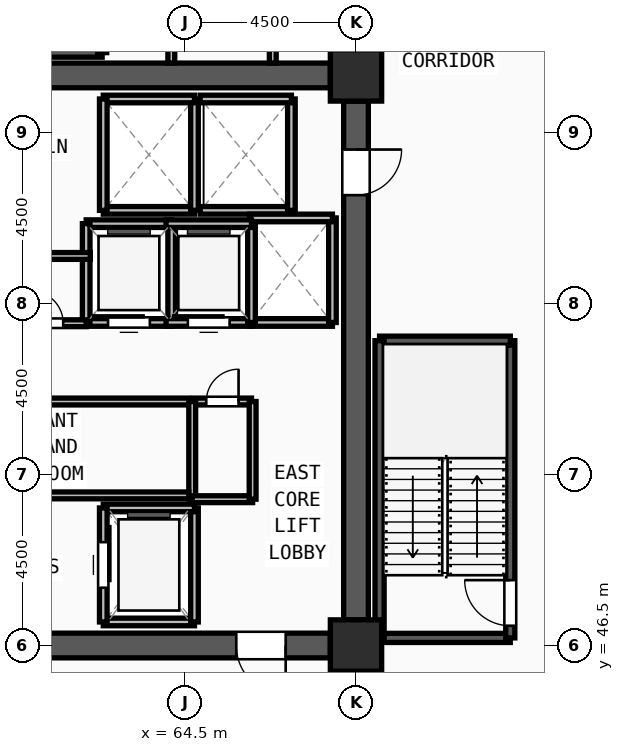
"""IFC4 building model, lengths in metres.
Left out: names, types, materials, properties, quantities, classifications, styles, units other than length and angle.
Written with IfcOpenShell. Run it as: python <this file> out.ifc"""

import sys

from ifc_helpers import new_model, si_unit, direction, frame, frame_2d, origin, origin_2d, place, context, subcontext, project, spatial, rectangle, extrude, source, transform, mapped, element, fill, save


model = new_model("IFC4")
c1 = context("Model", 3, precision=1e-05, world=origin(), true_north=direction((0.0, 1.0)))
c2 = subcontext(c1, "Body", "Model", "MODEL_VIEW")
j1 = project(units=[si_unit("LENGTHUNIT", "METRE"), si_unit("PLANEANGLEUNIT", "RADIAN")], contexts=[c1])
p1 = place(None, origin())
s1 = spatial("IfcSite", under=j1, at=p1, CompositionType="ELEMENT")
p2 = place(p1, origin())
s2 = spatial("IfcBuilding", under=s1, at=p2, CompositionType="ELEMENT")
p3 = place(p2, frame((0.0, 0.0, 270.0)))
s3 = spatial("IfcBuildingStorey", under=s2, at=p3, CompositionType="ELEMENT", Elevation=270.0)
m1 = source(origin(), c2, "Body", "SweptSolid", [
    extrude(rectangle(XDim=1.35, YDim=1.35, at=origin_2d()), origin(), (0.0, 0.0, 1.0), 3.75),
])
for number, where, z_axis, x_axis in (
    (1, (69.0, 46.5, 0.0), (0.0, 0.0, 1.0), (1.0, 0.0, 0.0)),
    (2, (69.0, 61.5, 0.0), (0.0, 0.0, 1.0), (1.0, 0.0, 0.0)),
):
    element("IfcColumn", number, at=place(p3, frame(where, z_axis=z_axis, x_axis=x_axis)), inside=s3, PredefinedType="COLUMN", context=c2, shape_type="MappedRepresentation", body=[
        mapped(m1, transform((0.0, 0.0, 0.0), x_axis=(1.0, 0.0, 0.0), y_axis=(0.0, 1.0, 0.0), z_axis=(0.0, 0.0, 1.0), scale=1.0)),
    ])
p4 = place(p3, frame((60.675, 61.5, 0.0), z_axis=(0.0, 0.0, 1.0), x_axis=(1.0, 0.0, 0.0)))
e3 = element("IfcWall", 3, at=p4, inside=s3, PredefinedType="SHEAR", context=c2, shape_type="SweptSolid", body=[
    extrude(rectangle(XDim=7.65, YDim=0.65, at=frame_2d((3.825, 0.0))), origin(), (0.0, 0.0, 1.0), 3.57),
])
p5 = place(p3, frame((69.0, 60.825, 0.0), z_axis=(0.0, 0.0, 1.0), x_axis=(0.0, -1.0, 0.0)))
e4 = element("IfcWall", 4, at=p5, inside=s3, PredefinedType="SHEAR", context=c2, shape_type="SweptSolid", body=[
    extrude(rectangle(XDim=13.65, YDim=0.65, at=frame_2d((6.825, 0.0))), origin(), (0.0, 0.0, 1.0), 3.57),
])
m2 = source(origin(), c2, "Body", "SweptSolid", [
    extrude(rectangle(XDim=1.2, YDim=2.2, at=frame_2d((0.6, 1.1))), frame((0.0, 0.335, 0.0), z_axis=(0.0, -1.0, 0.0), x_axis=(1.0, 0.0, 0.0)), (0.0, 0.0, 1.0), 0.67),
])
p6 = place(p5, frame((1.275, 0.0, 0.0)))
e5 = element("IfcOpeningElement", 5, at=p6, cuts=e4, PredefinedType="OPENING", context=c2, shape_type="MappedRepresentation", body=[
    mapped(m2, transform((0.0, 0.0, 0.0), x_axis=(1.0, 0.0, 0.0), y_axis=(0.0, 1.0, 0.0), z_axis=(0.0, 0.0, 1.0), scale=1.0)),
])
p7 = place(p3, frame((68.325, 46.5, 0.0), z_axis=(0.0, 0.0, 1.0), x_axis=(-1.0, 0.0, 0.0)))
e6 = element("IfcWall", 6, at=p7, inside=s3, PredefinedType="SHEAR", context=c2, shape_type="SweptSolid", body=[
    extrude(rectangle(XDim=7.65, YDim=0.65, at=frame_2d((3.825, 0.0))), origin(), (0.0, 0.0, 1.0), 3.57),
])
m3 = source(origin(), c2, "Body", "SweptSolid", [
    extrude(rectangle(XDim=1.3, YDim=2.2, at=frame_2d((0.65, 1.1))), frame((0.0, 0.335, 0.0), z_axis=(0.0, -1.0, 0.0), x_axis=(1.0, 0.0, 0.0)), (0.0, 0.0, 1.0), 0.67),
])
p8 = place(p7, frame((1.175, 0.0, 0.0)))
e7 = element("IfcOpeningElement", 7, at=p8, cuts=e6, PredefinedType="OPENING", context=c2, shape_type="MappedRepresentation", body=[
    mapped(m3, transform((0.0, 0.0, 0.0), x_axis=(1.0, 0.0, 0.0), y_axis=(0.0, 1.0, 0.0), z_axis=(0.0, 0.0, 1.0), scale=1.0)),
])
p9 = place(p3, frame((69.62, 46.7, 0.0), z_axis=(0.0, 0.0, 1.0), x_axis=(1.0, 0.0, 0.0)))
e8 = element("IfcWall", 8, at=p9, inside=s3, PredefinedType="SOLIDWALL", context=c2, shape_type="SweptSolid", body=[
    extrude(rectangle(XDim=3.44, YDim=0.24, at=frame_2d((1.72, 0.0))), origin(), (0.0, 0.0, 1.0), 3.57),
])
p10 = place(p3, frame((73.06, 46.7, 0.0), z_axis=(0.0, 0.0, 1.0), x_axis=(0.0, 1.0, 0.0)))
e9 = element("IfcWall", 9, at=p10, inside=s3, PredefinedType="SOLIDWALL", context=c2, shape_type="SweptSolid", body=[
    extrude(rectangle(XDim=7.82, YDim=0.24, at=frame_2d((3.91, 0.0))), origin(), (0.0, 0.0, 1.0), 3.57),
])
m4 = source(origin(), c2, "Body", "SweptSolid", [
    extrude(rectangle(XDim=1.2, YDim=2.2, at=frame_2d((0.6, 1.1))), frame((0.0, 0.13, 0.0), z_axis=(0.0, -1.0, 0.0), x_axis=(1.0, 0.0, 0.0)), (0.0, 0.0, 1.0), 0.26),
])
p11 = place(p10, frame((0.32, 0.0, 0.0)))
e10 = element("IfcOpeningElement", 10, at=p11, cuts=e9, PredefinedType="OPENING", context=c2, shape_type="MappedRepresentation", body=[
    mapped(m4, transform((0.0, 0.0, 0.0), x_axis=(1.0, 0.0, 0.0), y_axis=(0.0, 1.0, 0.0), z_axis=(0.0, 0.0, 1.0), scale=1.0)),
])
p12 = place(p3, frame((73.06, 54.52, 0.0), z_axis=(0.0, 0.0, 1.0), x_axis=(-1.0, 0.0, 0.0)))
e11 = element("IfcWall", 11, at=p12, inside=s3, PredefinedType="SOLIDWALL", context=c2, shape_type="SweptSolid", body=[
    extrude(rectangle(XDim=3.44, YDim=0.24, at=frame_2d((1.72, 0.0))), origin(), (0.0, 0.0, 1.0), 3.57),
])
for number, where, z_axis, x_axis in (
    (12, (69.62, 54.52, 0.0), (0.0, 0.0, 1.0), (0.0, -1.0, 0.0)),
    (13, (54.5, 62.1, 0.0), (0.0, 0.0, 1.0), (1.0, 0.0, 0.0)),
):
    element("IfcWall", number, at=place(p3, frame(where, z_axis=z_axis, x_axis=x_axis)), inside=s3, PredefinedType="SOLIDWALL", context=c2, shape_type="SweptSolid", body=[
        extrude(rectangle(XDim=7.82, YDim=0.24, at=frame_2d((3.91, 0.0))), origin(), (0.0, 0.0, 1.0), 3.57),
    ])
p13 = place(p3, frame((62.32, 62.1, 0.0), z_axis=(0.0, 0.0, 1.0), x_axis=(0.0, 1.0, 0.0)))
e14 = element("IfcWall", 14, at=p13, inside=s3, PredefinedType="SOLIDWALL", context=c2, shape_type="SweptSolid", body=[
    extrude(rectangle(XDim=3.44, YDim=0.24, at=frame_2d((1.72, 0.0))), origin(), (0.0, 0.0, 1.0), 3.57),
])
p14 = place(p3, frame((62.35, 47.12, 0.0), z_axis=(0.0, 0.0, 1.0), x_axis=(1.0, 0.0, 0.0)))
e15 = element("IfcWall", 15, at=p14, inside=s3, PredefinedType="SOLIDWALL", context=c2, shape_type="SweptSolid", body=[
    extrude(rectangle(XDim=2.4, YDim=0.2, at=frame_2d((1.2, 0.0))), origin(), (0.0, 0.0, 1.0), 3.57),
])
p15 = place(p3, frame((64.75, 47.12, 0.0), z_axis=(0.0, 0.0, 1.0), x_axis=(0.0, 1.0, 0.0)))
e16 = element("IfcWall", 16, at=p15, inside=s3, PredefinedType="SOLIDWALL", context=c2, shape_type="SweptSolid", body=[
    extrude(rectangle(XDim=3.0, YDim=0.2, at=frame_2d((1.5, 0.0))), origin(), (0.0, 0.0, 1.0), 3.57),
])
p16 = place(p3, frame((64.75, 50.12, 0.0), z_axis=(0.0, 0.0, 1.0), x_axis=(-1.0, 0.0, 0.0)))
e17 = element("IfcWall", 17, at=p16, inside=s3, PredefinedType="SOLIDWALL", context=c2, shape_type="SweptSolid", body=[
    extrude(rectangle(XDim=2.4, YDim=0.2, at=frame_2d((1.2, 0.0))), origin(), (0.0, 0.0, 1.0), 3.57),
])
p17 = place(p3, frame((62.35, 50.12, 0.0), z_axis=(0.0, 0.0, 1.0), x_axis=(0.0, -1.0, 0.0)))
e18 = element("IfcWall", 18, at=p17, inside=s3, PredefinedType="SOLIDWALL", context=c2, shape_type="SweptSolid", body=[
    extrude(rectangle(XDim=3.0, YDim=0.2, at=frame_2d((1.5, 0.0))), origin(), (0.0, 0.0, 1.0), 3.57),
])
m5 = source(origin(), c2, "Body", "SweptSolid", [
    extrude(rectangle(XDim=1.2, YDim=2.3, at=frame_2d((0.6, 1.15))), frame((0.0, 0.11, 0.0), z_axis=(0.0, -1.0, 0.0), x_axis=(1.0, 0.0, 0.0)), (0.0, 0.0, 1.0), 0.22),
])
p18 = place(p17, frame((0.9, 0.0, 0.0)))
e19 = element("IfcOpeningElement", 19, at=p18, cuts=e18, PredefinedType="OPENING", context=c2, shape_type="MappedRepresentation", body=[
    mapped(m5, transform((0.0, 0.0, 0.0), x_axis=(1.0, 0.0, 0.0), y_axis=(0.0, 1.0, 0.0), z_axis=(0.0, 0.0, 1.0), scale=1.0)),
])
p19 = place(p3, frame((62.35, 57.95, 0.0), z_axis=(0.0, 0.0, 1.0), x_axis=(1.0, 0.0, 0.0)))
e20 = element("IfcWall", 20, at=p19, inside=s3, PredefinedType="SOLIDWALL", context=c2, shape_type="SweptSolid", body=[
    extrude(rectangle(XDim=2.4, YDim=0.2, at=frame_2d((1.2, 0.0))), origin(), (0.0, 0.0, 1.0), 3.57),
])
p20 = place(p3, frame((64.75, 57.95, 0.0), z_axis=(0.0, 0.0, 1.0), x_axis=(0.0, 1.0, 0.0)))
e21 = element("IfcWall", 21, at=p20, inside=s3, PredefinedType="SOLIDWALL", context=c2, shape_type="SweptSolid", body=[
    extrude(rectangle(XDim=2.93, YDim=0.2, at=frame_2d((1.465, 0.0))), origin(), (0.0, 0.0, 1.0), 3.57),
])
p21 = place(p3, frame((64.75, 60.88, 0.0), z_axis=(0.0, 0.0, 1.0), x_axis=(-1.0, 0.0, 0.0)))
e22 = element("IfcWall", 22, at=p21, inside=s3, PredefinedType="SOLIDWALL", context=c2, shape_type="SweptSolid", body=[
    extrude(rectangle(XDim=2.4, YDim=0.2, at=frame_2d((1.2, 0.0))), origin(), (0.0, 0.0, 1.0), 3.57),
])
p22 = place(p3, frame((62.35, 60.88, 0.0), z_axis=(0.0, 0.0, 1.0), x_axis=(0.0, -1.0, 0.0)))
e23 = element("IfcWall", 23, at=p22, inside=s3, PredefinedType="SOLIDWALL", context=c2, shape_type="SweptSolid", body=[
    extrude(rectangle(XDim=2.93, YDim=0.2, at=frame_2d((1.465, 0.0))), origin(), (0.0, 0.0, 1.0), 3.57),
])
p23 = place(p3, frame((64.9, 57.95, 0.0), z_axis=(0.0, 0.0, 1.0), x_axis=(1.0, 0.0, 0.0)))
e24 = element("IfcWall", 24, at=p23, inside=s3, PredefinedType="SOLIDWALL", context=c2, shape_type="SweptSolid", body=[
    extrude(rectangle(XDim=2.4, YDim=0.2, at=frame_2d((1.2, 0.0))), origin(), (0.0, 0.0, 1.0), 3.57),
])
p24 = place(p3, frame((67.3, 57.95, 0.0), z_axis=(0.0, 0.0, 1.0), x_axis=(0.0, 1.0, 0.0)))
e25 = element("IfcWall", 25, at=p24, inside=s3, PredefinedType="SOLIDWALL", context=c2, shape_type="SweptSolid", body=[
    extrude(rectangle(XDim=2.93, YDim=0.2, at=frame_2d((1.465, 0.0))), origin(), (0.0, 0.0, 1.0), 3.57),
])
p25 = place(p3, frame((67.3, 60.88, 0.0), z_axis=(0.0, 0.0, 1.0), x_axis=(-1.0, 0.0, 0.0)))
e26 = element("IfcWall", 26, at=p25, inside=s3, PredefinedType="SOLIDWALL", context=c2, shape_type="SweptSolid", body=[
    extrude(rectangle(XDim=2.4, YDim=0.2, at=frame_2d((1.2, 0.0))), origin(), (0.0, 0.0, 1.0), 3.57),
])
p26 = place(p3, frame((66.2, 55.0, 0.0), z_axis=(0.0, 0.0, 1.0), x_axis=(1.0, 0.0, 0.0)))
e27 = element("IfcWall", 27, at=p26, inside=s3, PredefinedType="SOLIDWALL", context=c2, shape_type="SweptSolid", body=[
    extrude(rectangle(XDim=2.18, YDim=0.2, at=frame_2d((1.09, 0.0))), origin(), (0.0, 0.0, 1.0), 3.57),
])
p27 = place(p3, frame((68.38, 55.0, 0.0), z_axis=(0.0, 0.0, 1.0), x_axis=(0.0, 1.0, 0.0)))
e28 = element("IfcWall", 28, at=p27, inside=s3, PredefinedType="SOLIDWALL", context=c2, shape_type="SweptSolid", body=[
    extrude(rectangle(XDim=2.75, YDim=0.2, at=frame_2d((1.375, 0.0))), origin(), (0.0, 0.0, 1.0), 3.57),
])
p28 = place(p3, frame((68.38, 57.75, 0.0), z_axis=(0.0, 0.0, 1.0), x_axis=(-1.0, 0.0, 0.0)))
e29 = element("IfcWall", 29, at=p28, inside=s3, PredefinedType="SOLIDWALL", context=c2, shape_type="SweptSolid", body=[
    extrude(rectangle(XDim=2.18, YDim=0.2, at=frame_2d((1.09, 0.0))), origin(), (0.0, 0.0, 1.0), 3.57),
])
p29 = place(p3, frame((61.9, 55.0, 0.0), z_axis=(0.0, 0.0, 1.0), x_axis=(1.0, 0.0, 0.0)))
e30 = element("IfcWall", 30, at=p29, inside=s3, PredefinedType="SOLIDWALL", context=c2, shape_type="SweptSolid", body=[
    extrude(rectangle(XDim=2.25, YDim=0.2, at=frame_2d((1.125, 0.0))), origin(), (0.0, 0.0, 1.0), 3.57),
])
m6 = source(origin(), c2, "Body", "SweptSolid", [
    extrude(rectangle(XDim=1.1, YDim=2.2, at=frame_2d((0.55, 1.1))), frame((0.0, 0.11, 0.0), z_axis=(0.0, -1.0, 0.0), x_axis=(1.0, 0.0, 0.0)), (0.0, 0.0, 1.0), 0.22),
])
p30 = place(p29, frame((0.575, 0.0, 0.0)))
e31 = element("IfcOpeningElement", 31, at=p30, cuts=e30, PredefinedType="OPENING", context=c2, shape_type="MappedRepresentation", body=[
    mapped(m6, transform((0.0, 0.0, 0.0), x_axis=(1.0, 0.0, 0.0), y_axis=(0.0, 1.0, 0.0), z_axis=(0.0, 0.0, 1.0), scale=1.0)),
])
p31 = place(p3, frame((64.15, 55.0, 0.0), z_axis=(0.0, 0.0, 1.0), x_axis=(0.0, 1.0, 0.0)))
e32 = element("IfcWall", 32, at=p31, inside=s3, PredefinedType="SOLIDWALL", context=c2, shape_type="SweptSolid", body=[
    extrude(rectangle(XDim=2.6, YDim=0.2, at=frame_2d((1.3, 0.0))), origin(), (0.0, 0.0, 1.0), 3.57),
])
p32 = place(p3, frame((64.15, 57.6, 0.0), z_axis=(0.0, 0.0, 1.0), x_axis=(-1.0, 0.0, 0.0)))
e33 = element("IfcWall", 33, at=p32, inside=s3, PredefinedType="SOLIDWALL", context=c2, shape_type="SweptSolid", body=[
    extrude(rectangle(XDim=2.25, YDim=0.2, at=frame_2d((1.125, 0.0))), origin(), (0.0, 0.0, 1.0), 3.57),
])
p33 = place(p3, frame((61.9, 57.6, 0.0), z_axis=(0.0, 0.0, 1.0), x_axis=(0.0, -1.0, 0.0)))
e34 = element("IfcWall", 34, at=p33, inside=s3, PredefinedType="SOLIDWALL", context=c2, shape_type="SweptSolid", body=[
    extrude(rectangle(XDim=2.6, YDim=0.2, at=frame_2d((1.3, 0.0))), origin(), (0.0, 0.0, 1.0), 3.57),
])
p34 = place(p3, frame((64.0, 55.0, 0.0), z_axis=(0.0, 0.0, 1.0), x_axis=(1.0, 0.0, 0.0)))
e35 = element("IfcWall", 35, at=p34, inside=s3, PredefinedType="SOLIDWALL", context=c2, shape_type="SweptSolid", body=[
    extrude(rectangle(XDim=2.25, YDim=0.2, at=frame_2d((1.125, 0.0))), origin(), (0.0, 0.0, 1.0), 3.57),
])
p35 = place(p34, frame((0.575, 0.0, 0.0)))
e36 = element("IfcOpeningElement", 36, at=p35, cuts=e35, PredefinedType="OPENING", context=c2, shape_type="MappedRepresentation", body=[
    mapped(m6, transform((0.0, 0.0, 0.0), x_axis=(1.0, 0.0, 0.0), y_axis=(0.0, 1.0, 0.0), z_axis=(0.0, 0.0, 1.0), scale=1.0)),
])
p36 = place(p3, frame((66.25, 55.0, 0.0), z_axis=(0.0, 0.0, 1.0), x_axis=(0.0, 1.0, 0.0)))
e37 = element("IfcWall", 37, at=p36, inside=s3, PredefinedType="SOLIDWALL", context=c2, shape_type="SweptSolid", body=[
    extrude(rectangle(XDim=2.6, YDim=0.2, at=frame_2d((1.3, 0.0))), origin(), (0.0, 0.0, 1.0), 3.57),
])
p37 = place(p3, frame((66.25, 57.6, 0.0), z_axis=(0.0, 0.0, 1.0), x_axis=(-1.0, 0.0, 0.0)))
e38 = element("IfcWall", 38, at=p37, inside=s3, PredefinedType="SOLIDWALL", context=c2, shape_type="SweptSolid", body=[
    extrude(rectangle(XDim=2.25, YDim=0.2, at=frame_2d((1.125, 0.0))), origin(), (0.0, 0.0, 1.0), 3.57),
])
p38 = place(p3, frame((55.39, 52.92, 0.0), z_axis=(0.0, 0.0, 1.0), x_axis=(1.0, 0.0, 0.0)))
e39 = element("IfcWall", 39, at=p38, inside=s3, PredefinedType="PARTITIONING", context=c2, shape_type="SweptSolid", body=[
    extrude(rectangle(XDim=9.21, YDim=0.18, at=frame_2d((4.605, 0.0))), origin(), (0.0, 0.0, 1.0), 3.57),
])
m7 = source(origin(), c2, "Body", "SweptSolid", [
    extrude(rectangle(XDim=0.85, YDim=2.1, at=frame_2d((0.425, 1.05))), frame((0.0, 0.1, 0.0), z_axis=(0.0, -1.0, 0.0), x_axis=(1.0, 0.0, 0.0)), (0.0, 0.0, 1.0), 0.2),
])
p39 = place(p38, frame((4.185, 0.0, 0.0)))
e40 = element("IfcOpeningElement", 40, at=p39, cuts=e39, PredefinedType="OPENING", context=c2, shape_type="MappedRepresentation", body=[
    mapped(m7, transform((0.0, 0.0, 0.0), x_axis=(1.0, 0.0, 0.0), y_axis=(0.0, 1.0, 0.0), z_axis=(0.0, 0.0, 1.0), scale=1.0)),
])
p40 = place(p3, frame((59.81, 54.98, 0.0), z_axis=(0.0, 0.0, 1.0), x_axis=(1.0, 0.0, 0.0)))
e41 = element("IfcWall", 41, at=p40, inside=s3, PredefinedType="PARTITIONING", context=c2, shape_type="SweptSolid", body=[
    extrude(rectangle(XDim=2.09, YDim=0.18, at=frame_2d((1.045, 0.0))), origin(), (0.0, 0.0, 1.0), 3.57),
])
p41 = place(p40, frame((0.635, 0.0, 0.0)))
e42 = element("IfcOpeningElement", 42, at=p41, cuts=e41, PredefinedType="OPENING", context=c2, shape_type="MappedRepresentation", body=[
    mapped(m7, transform((0.0, 0.0, 0.0), x_axis=(1.0, 0.0, 0.0), y_axis=(0.0, 1.0, 0.0), z_axis=(0.0, 0.0, 1.0), scale=1.0)),
])
p42 = place(p3, frame((64.72, 52.92, 0.0), z_axis=(0.0, 0.0, 1.0), x_axis=(1.0, 0.0, 0.0)))
e43 = element("IfcWall", 43, at=p42, inside=s3, PredefinedType="PARTITIONING", context=c2, shape_type="SweptSolid", body=[
    extrude(rectangle(XDim=1.53, YDim=0.18, at=frame_2d((0.765, 0.0))), origin(), (0.0, 0.0, 1.0), 3.57),
])
p43 = place(p42, frame((0.34, 0.0, 0.0)))
e44 = element("IfcOpeningElement", 44, at=p43, cuts=e43, PredefinedType="OPENING", context=c2, shape_type="MappedRepresentation", body=[
    mapped(m7, transform((0.0, 0.0, 0.0), x_axis=(1.0, 0.0, 0.0), y_axis=(0.0, 1.0, 0.0), z_axis=(0.0, 0.0, 1.0), scale=1.0)),
])
p44 = place(p3, frame((59.72, 56.75, 0.0), z_axis=(0.0, 0.0, 1.0), x_axis=(1.0, 0.0, 0.0)))
e45 = element("IfcWall", 45, at=p44, inside=s3, PredefinedType="PARTITIONING", context=c2, shape_type="SweptSolid", body=[
    extrude(rectangle(XDim=2.29, YDim=0.18, at=frame_2d((1.145, 0.0))), origin(), (0.0, 0.0, 1.0), 3.57),
])
p45 = place(p3, frame((64.69, 50.35, 0.0), z_axis=(0.0, 0.0, 1.0), x_axis=(0.0, 1.0, 0.0)))
e46 = element("IfcWall", 46, at=p45, inside=s3, PredefinedType="PARTITIONING", context=c2, shape_type="SweptSolid", body=[
    extrude(rectangle(XDim=2.57, YDim=0.18, at=frame_2d((1.285, 0.0))), origin(), (0.0, 0.0, 1.0), 3.57),
])
p46 = place(p3, frame((64.69, 50.35, 0.0), z_axis=(0.0, 0.0, 1.0), x_axis=(1.0, 0.0, 0.0)))
e47 = element("IfcWall", 47, at=p46, inside=s3, PredefinedType="PARTITIONING", context=c2, shape_type="SweptSolid", body=[
    extrude(rectangle(XDim=1.59, YDim=0.18, at=frame_2d((0.795, 0.0))), origin(), (0.0, 0.0, 1.0), 3.57),
])
p47 = place(p3, frame((66.28, 50.35, 0.0), z_axis=(0.0, 0.0, 1.0), x_axis=(0.0, 1.0, 0.0)))
e48 = element("IfcWall", 48, at=p47, inside=s3, PredefinedType="PARTITIONING", context=c2, shape_type="SweptSolid", body=[
    extrude(rectangle(XDim=2.57, YDim=0.18, at=frame_2d((1.285, 0.0))), origin(), (0.0, 0.0, 1.0), 3.57),
])
for number, where, z_axis, x_axis in (
    (49, (64.14, 61.825, 0.0), (0.0, 0.0, 1.0), (0.0, 1.0, 0.0)),
    (50, (66.81, 61.825, 0.0), (0.0, 0.0, 1.0), (0.0, 1.0, 0.0)),
):
    element("IfcWall", number, at=place(p3, frame(where, z_axis=z_axis, x_axis=x_axis)), inside=s3, PredefinedType="PARTITIONING", context=c2, shape_type="SweptSolid", body=[
        extrude(rectangle(XDim=3.755, YDim=0.18, at=frame_2d((1.877, 0.0))), origin(), (0.0, 0.0, 1.0), 3.57),
    ])
p48 = place(p3, frame((55.39, 50.45, 0.0), z_axis=(0.0, 0.0, 1.0), x_axis=(1.0, 0.0, 0.0)))
e51 = element("IfcWall", 51, at=p48, inside=s3, PredefinedType="PARTITIONING", context=c2, shape_type="SweptSolid", body=[
    extrude(rectangle(XDim=9.21, YDim=0.18, at=frame_2d((4.605, 0.0))), origin(), (0.0, 0.0, 1.0), 3.57),
])
m8 = source(origin(), c2, "Body", "SweptSolid", [
    extrude(rectangle(XDim=1.3, YDim=2.2, at=frame_2d((0.65, 1.1))), frame((0.0, 0.025, 0.0), z_axis=(0.0, -1.0, 0.0), x_axis=(1.0, 0.0, 0.0)), (0.0, 0.0, 1.0), 0.05),
])
p49 = place(p8, origin())
e52 = element("IfcDoor", 52, at=p49, inside=s3, OperationType="SINGLE_SWING_LEFT", PredefinedType="DOOR", context=c2, shape_type="MappedRepresentation", body=[
    mapped(m8, transform((0.0, 0.0, 0.0), x_axis=(1.0, 0.0, 0.0), y_axis=(0.0, 1.0, 0.0), z_axis=(0.0, 0.0, 1.0), scale=1.0)),
])
fill(e7, e52)
m9 = source(origin(), c2, "Body", "SweptSolid", [
    extrude(rectangle(XDim=1.2, YDim=2.2, at=frame_2d((0.6, 1.1))), frame((0.0, 0.025, 0.0), z_axis=(0.0, -1.0, 0.0), x_axis=(1.0, 0.0, 0.0)), (0.0, 0.0, 1.0), 0.05),
])
p50 = place(p6, origin())
e53 = element("IfcDoor", 53, at=p50, inside=s3, OperationType="SINGLE_SWING_LEFT", PredefinedType="DOOR", context=c2, shape_type="MappedRepresentation", body=[
    mapped(m9, transform((0.0, 0.0, 0.0), x_axis=(1.0, 0.0, 0.0), y_axis=(0.0, 1.0, 0.0), z_axis=(0.0, 0.0, 1.0), scale=1.0)),
])
fill(e5, e53)
p51 = place(p11, origin())
e54 = element("IfcDoor", 54, at=p51, inside=s3, OperationType="SINGLE_SWING_RIGHT", PredefinedType="DOOR", context=c2, shape_type="MappedRepresentation", body=[
    mapped(m9, transform((0.0, 0.0, 0.0), x_axis=(1.0, 0.0, 0.0), y_axis=(0.0, 1.0, 0.0), z_axis=(0.0, 0.0, 1.0), scale=1.0)),
])
fill(e10, e54)
m10 = source(origin(), c2, "Body", "SweptSolid", [
    extrude(rectangle(XDim=1.2, YDim=2.3, at=frame_2d((0.6, 1.15))), frame((0.0, 0.025, 0.0), z_axis=(0.0, -1.0, 0.0), x_axis=(1.0, 0.0, 0.0)), (0.0, 0.0, 1.0), 0.05),
])
p52 = place(p18, origin())
e55 = element("IfcDoor", 55, at=p52, inside=s3, OperationType="SLIDING_TO_LEFT", PredefinedType="DOOR", context=c2, shape_type="MappedRepresentation", body=[
    mapped(m10, transform((0.0, 0.0, 0.0), x_axis=(1.0, 0.0, 0.0), y_axis=(0.0, 1.0, 0.0), z_axis=(0.0, 0.0, 1.0), scale=1.0)),
])
fill(e19, e55)
m11 = source(origin(), c2, "Body", "SweptSolid", [
    extrude(rectangle(XDim=1.1, YDim=2.2, at=frame_2d((0.55, 1.1))), frame((0.0, 0.025, 0.0), z_axis=(0.0, -1.0, 0.0), x_axis=(1.0, 0.0, 0.0)), (0.0, 0.0, 1.0), 0.05),
])
p53 = place(p30, origin())
e56 = element("IfcDoor", 56, at=p53, inside=s3, OperationType="SLIDING_TO_LEFT", PredefinedType="DOOR", context=c2, shape_type="MappedRepresentation", body=[
    mapped(m11, transform((0.0, 0.0, 0.0), x_axis=(1.0, 0.0, 0.0), y_axis=(0.0, 1.0, 0.0), z_axis=(0.0, 0.0, 1.0), scale=1.0)),
])
fill(e31, e56)
p54 = place(p35, origin())
e57 = element("IfcDoor", 57, at=p54, inside=s3, OperationType="SLIDING_TO_LEFT", PredefinedType="DOOR", context=c2, shape_type="MappedRepresentation", body=[
    mapped(m11, transform((0.0, 0.0, 0.0), x_axis=(1.0, 0.0, 0.0), y_axis=(0.0, 1.0, 0.0), z_axis=(0.0, 0.0, 1.0), scale=1.0)),
])
fill(e36, e57)
m12 = source(origin(), c2, "Body", "SweptSolid", [
    extrude(rectangle(XDim=0.85, YDim=2.1, at=frame_2d((0.425, 1.05))), frame((0.0, 0.025, 0.0), z_axis=(0.0, -1.0, 0.0), x_axis=(1.0, 0.0, 0.0)), (0.0, 0.0, 1.0), 0.05),
])
p55 = place(p41, origin())
e58 = element("IfcDoor", 58, at=p55, inside=s3, OperationType="SINGLE_SWING_LEFT", PredefinedType="DOOR", context=c2, shape_type="MappedRepresentation", body=[
    mapped(m12, transform((0.0, 0.0, 0.0), x_axis=(1.0, 0.0, 0.0), y_axis=(0.0, 1.0, 0.0), z_axis=(0.0, 0.0, 1.0), scale=1.0)),
])
fill(e42, e58)
p56 = place(p43, origin())
e59 = element("IfcDoor", 59, at=p56, inside=s3, OperationType="SINGLE_SWING_RIGHT", PredefinedType="DOOR", context=c2, shape_type="MappedRepresentation", body=[
    mapped(m12, transform((0.0, 0.0, 0.0), x_axis=(1.0, 0.0, 0.0), y_axis=(0.0, 1.0, 0.0), z_axis=(0.0, 0.0, 1.0), scale=1.0)),
])
fill(e44, e59)
save(model, sys.argv[1])
